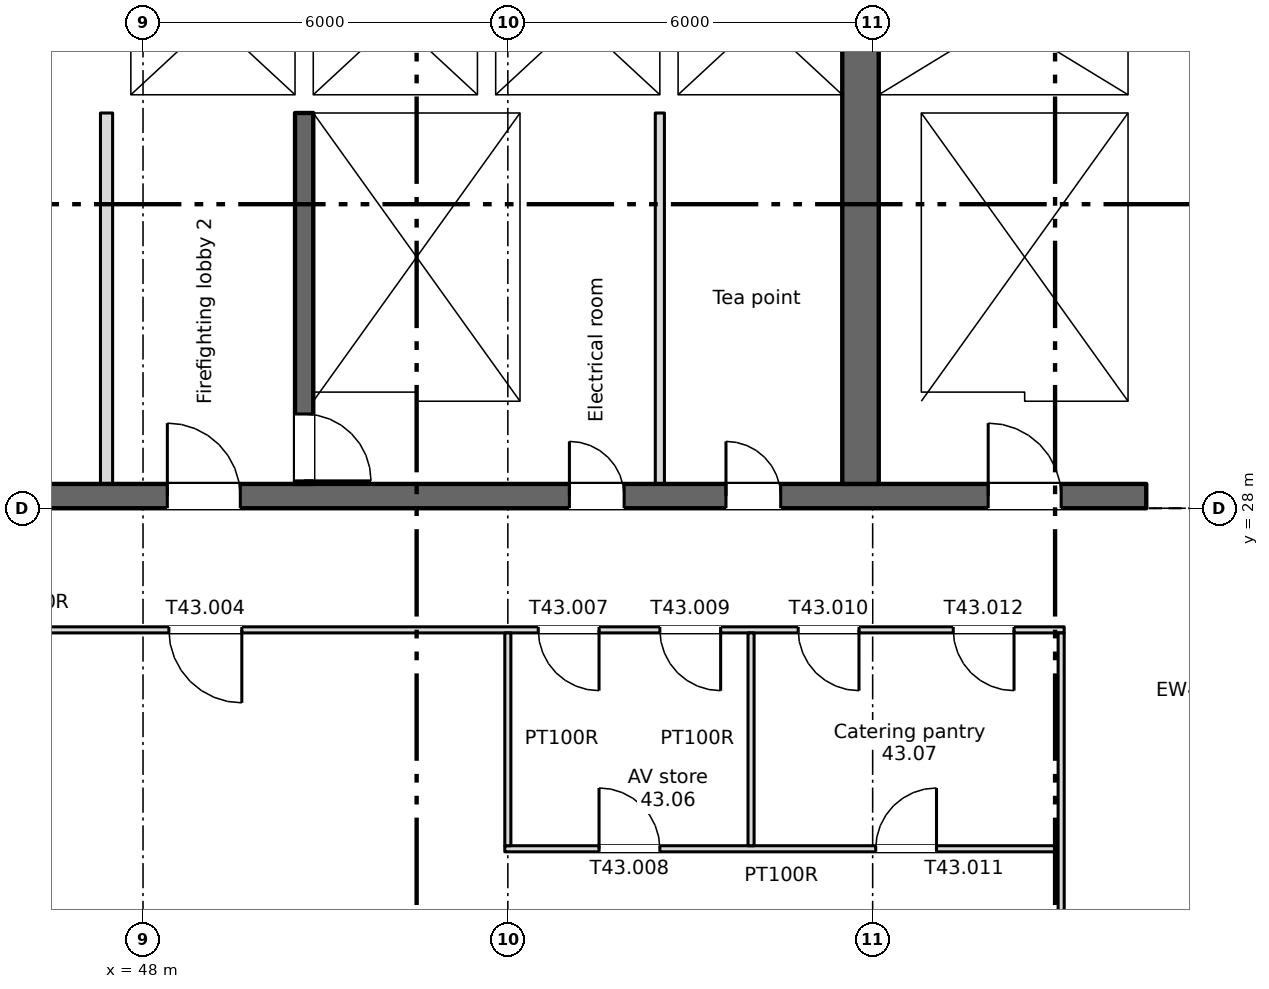
"""IFC4 building model, lengths in metres.
Left out: names, types, materials, properties, quantities, classifications, styles, units other than length and angle.
Written with IfcOpenShell. Run it as: python <this file> out.ifc"""

import sys

from ifc_helpers import new_model, si_unit, direction, frame, frame_2d, origin, place, context, subcontext, project, spatial, rectangle, extrude, element, fill, save


model = new_model("IFC4")
c1 = context("Model", 3, precision=1e-05, world=origin(), true_north=direction((0.0, 1.0)))
c2 = subcontext(c1, "Body", "Model", "MODEL_VIEW")
j1 = project(units=[si_unit("LENGTHUNIT", "METRE"), si_unit("PLANEANGLEUNIT", "RADIAN")], contexts=[c1])
p1 = place(None, origin())
s1 = spatial("IfcSite", under=j1, at=p1, CompositionType="ELEMENT")
p2 = place(p1, origin())
s2 = spatial("IfcBuilding", under=s1, at=p2, CompositionType="ELEMENT")
p3 = place(p2, frame((0.0, 0.0, 231.75)))
s3 = spatial("IfcBuildingStorey", under=s2, at=p3, CompositionType="ELEMENT", Elevation=231.75)
p4 = place(p3, frame((6.5, 28.2, 0.0), z_axis=(0.0, 0.0, 1.0), x_axis=(1.0, 0.0, 0.0)))
e1 = element("IfcWall", 1, at=p4, inside=s3, PredefinedType="SHEAR", context=c2, shape_type="SweptSolid", body=[
    extrude(rectangle(XDim=58.0, YDim=0.4, at=frame_2d((29.0, 0.0))), origin(), (0.0, 0.0, 1.0), 3.4),
])
p5 = place(p4, frame((13.012, 0.0, 0.0)))
e2 = element("IfcOpeningElement", 2, at=p5, cuts=e1, PredefinedType="OPENING", context=c2, shape_type="SweptSolid", body=[
    extrude(rectangle(XDim=0.9, YDim=2.1, at=frame_2d((0.45, 1.05))), frame((0.0, 0.21, 0.0), z_axis=(0.0, -1.0, 0.0), x_axis=(1.0, 0.0, 0.0)), (0.0, 0.0, 1.0), 0.42),
])
p6 = place(p4, frame((15.587, 0.0, 0.0)))
e3 = element("IfcOpeningElement", 3, at=p6, cuts=e1, PredefinedType="OPENING", context=c2, shape_type="SweptSolid", body=[
    extrude(rectangle(XDim=0.9, YDim=2.1, at=frame_2d((0.45, 1.05))), frame((0.0, 0.21, 0.0), z_axis=(0.0, -1.0, 0.0), x_axis=(1.0, 0.0, 0.0)), (0.0, 0.0, 1.0), 0.42),
])
p7 = place(p4, frame((48.512, 0.0, 0.0)))
e4 = element("IfcOpeningElement", 4, at=p7, cuts=e1, PredefinedType="OPENING", context=c2, shape_type="SweptSolid", body=[
    extrude(rectangle(XDim=0.9, YDim=2.1, at=frame_2d((0.45, 1.05))), frame((0.0, 0.21, 0.0), z_axis=(0.0, -1.0, 0.0), x_axis=(1.0, 0.0, 0.0)), (0.0, 0.0, 1.0), 0.42),
])
p8 = place(p4, frame((51.087, 0.0, 0.0)))
e5 = element("IfcOpeningElement", 5, at=p8, cuts=e1, PredefinedType="OPENING", context=c2, shape_type="SweptSolid", body=[
    extrude(rectangle(XDim=0.9, YDim=2.1, at=frame_2d((0.45, 1.05))), frame((0.0, 0.21, 0.0), z_axis=(0.0, -1.0, 0.0), x_axis=(1.0, 0.0, 0.0)), (0.0, 0.0, 1.0), 0.42),
])
p9 = place(p4, frame((0.762, 0.0, 0.0)))
e6 = element("IfcOpeningElement", 6, at=p9, cuts=e1, PredefinedType="OPENING", context=c2, shape_type="SweptSolid", body=[
    extrude(rectangle(XDim=0.9, YDim=2.1, at=frame_2d((0.45, 1.05))), frame((0.0, 0.21, 0.0), z_axis=(0.0, -1.0, 0.0), x_axis=(1.0, 0.0, 0.0)), (0.0, 0.0, 1.0), 0.42),
])
p10 = place(p4, frame((2.337, 0.0, 0.0)))
e7 = element("IfcOpeningElement", 7, at=p10, cuts=e1, PredefinedType="OPENING", context=c2, shape_type="SweptSolid", body=[
    extrude(rectangle(XDim=0.9, YDim=2.1, at=frame_2d((0.45, 1.05))), frame((0.0, 0.21, 0.0), z_axis=(0.0, -1.0, 0.0), x_axis=(1.0, 0.0, 0.0)), (0.0, 0.0, 1.0), 0.42),
])
p11 = place(p4, frame((4.9, 0.0, 0.0)))
e8 = element("IfcOpeningElement", 8, at=p11, cuts=e1, PredefinedType="OPENING", context=c2, shape_type="SweptSolid", body=[
    extrude(rectangle(XDim=1.2, YDim=2.1, at=frame_2d((0.6, 1.05))), frame((0.0, 0.21, 0.0), z_axis=(0.0, -1.0, 0.0), x_axis=(1.0, 0.0, 0.0)), (0.0, 0.0, 1.0), 0.42),
])
p12 = place(p4, frame((31.9, 0.0, 0.0)))
e9 = element("IfcOpeningElement", 9, at=p12, cuts=e1, PredefinedType="OPENING", context=c2, shape_type="SweptSolid", body=[
    extrude(rectangle(XDim=1.2, YDim=2.1, at=frame_2d((0.6, 1.05))), frame((0.0, 0.21, 0.0), z_axis=(0.0, -1.0, 0.0), x_axis=(1.0, 0.0, 0.0)), (0.0, 0.0, 1.0), 0.42),
])
p13 = place(p4, frame((55.4, 0.0, 0.0)))
e10 = element("IfcOpeningElement", 10, at=p13, cuts=e1, PredefinedType="OPENING", context=c2, shape_type="SweptSolid", body=[
    extrude(rectangle(XDim=1.2, YDim=2.1, at=frame_2d((0.6, 1.05))), frame((0.0, 0.21, 0.0), z_axis=(0.0, -1.0, 0.0), x_axis=(1.0, 0.0, 0.0)), (0.0, 0.0, 1.0), 0.42),
])
p14 = place(p4, frame((21.9, 0.0, 0.0)))
e11 = element("IfcOpeningElement", 11, at=p14, cuts=e1, PredefinedType="OPENING", context=c2, shape_type="SweptSolid", body=[
    extrude(rectangle(XDim=1.2, YDim=2.1, at=frame_2d((0.6, 1.05))), frame((0.0, 0.21, 0.0), z_axis=(0.0, -1.0, 0.0), x_axis=(1.0, 0.0, 0.0)), (0.0, 0.0, 1.0), 0.42),
])
p15 = place(p4, frame((41.9, 0.0, 0.0)))
e12 = element("IfcOpeningElement", 12, at=p15, cuts=e1, PredefinedType="OPENING", context=c2, shape_type="SweptSolid", body=[
    extrude(rectangle(XDim=1.2, YDim=2.1, at=frame_2d((0.6, 1.05))), frame((0.0, 0.21, 0.0), z_axis=(0.0, -1.0, 0.0), x_axis=(1.0, 0.0, 0.0)), (0.0, 0.0, 1.0), 0.42),
])
p16 = place(p4, frame((25.05, 0.0, 0.0)))
e13 = element("IfcOpeningElement", 13, at=p16, cuts=e1, PredefinedType="OPENING", context=c2, shape_type="SweptSolid", body=[
    extrude(rectangle(XDim=2.4, YDim=2.1, at=frame_2d((1.2, 1.05))), frame((0.0, 0.21, 0.0), z_axis=(0.0, -1.0, 0.0), x_axis=(1.0, 0.0, 0.0)), (0.0, 0.0, 1.0), 0.42),
])
p17 = place(p4, frame((37.55, 0.0, 0.0)))
e14 = element("IfcOpeningElement", 14, at=p17, cuts=e1, PredefinedType="OPENING", context=c2, shape_type="SweptSolid", body=[
    extrude(rectangle(XDim=2.4, YDim=2.1, at=frame_2d((1.2, 1.05))), frame((0.0, 0.21, 0.0), z_axis=(0.0, -1.0, 0.0), x_axis=(1.0, 0.0, 0.0)), (0.0, 0.0, 1.0), 0.42),
])
p18 = place(p4, frame((8.25, 0.0, 0.0)))
e15 = element("IfcOpeningElement", 15, at=p18, cuts=e1, PredefinedType="OPENING", context=c2, shape_type="SweptSolid", body=[
    extrude(rectangle(XDim=2.4, YDim=2.1, at=frame_2d((1.2, 1.05))), frame((0.0, 0.21, 0.0), z_axis=(0.0, -1.0, 0.0), x_axis=(1.0, 0.0, 0.0)), (0.0, 0.0, 1.0), 0.42),
])
p19 = place(p4, frame((29.05, 0.0, 0.0)))
e16 = element("IfcOpeningElement", 16, at=p19, cuts=e1, PredefinedType="OPENING", context=c2, shape_type="SweptSolid", body=[
    extrude(rectangle(XDim=0.9, YDim=2.1, at=frame_2d((0.45, 1.05))), frame((0.0, 0.21, 0.0), z_axis=(0.0, -1.0, 0.0), x_axis=(1.0, 0.0, 0.0)), (0.0, 0.0, 1.0), 0.42),
])
p20 = place(p4, frame((35.05, 0.0, 0.0)))
e17 = element("IfcOpeningElement", 17, at=p20, cuts=e1, PredefinedType="OPENING", context=c2, shape_type="SweptSolid", body=[
    extrude(rectangle(XDim=0.9, YDim=2.1, at=frame_2d((0.45, 1.05))), frame((0.0, 0.21, 0.0), z_axis=(0.0, -1.0, 0.0), x_axis=(1.0, 0.0, 0.0)), (0.0, 0.0, 1.0), 0.42),
])
p21 = place(p3, frame((64.35, 34.8, 0.0), z_axis=(0.0, 0.0, 1.0), x_axis=(0.0, 1.0, 0.0)))
e18 = element("IfcWall", 18, at=p21, inside=s3, PredefinedType="SHEAR", context=c2, shape_type="SweptSolid", body=[
    extrude(rectangle(XDim=6.45, YDim=0.3, at=frame_2d((3.225, 0.0))), origin(), (0.0, 0.0, 1.0), 3.4),
])
p22 = place(p3, frame((59.8, 28.4, 0.0), z_axis=(0.0, 0.0, 1.0), x_axis=(0.0, 1.0, 0.0)))
e19 = element("IfcWall", 19, at=p22, inside=s3, PredefinedType="SHEAR", context=c2, shape_type="SweptSolid", body=[
    extrude(rectangle(XDim=15.1, YDim=0.6, at=frame_2d((7.55, 0.0))), origin(), (0.0, 0.0, 1.0), 3.4),
])
p23 = place(p22, frame((9.6, 0.0, 0.0)))
e20 = element("IfcOpeningElement", 20, at=p23, cuts=e19, PredefinedType="OPENING", context=c2, shape_type="SweptSolid", body=[
    extrude(rectangle(XDim=2.0, YDim=2.1, at=frame_2d((1.0, 1.05))), frame((0.0, 0.31, 0.0), z_axis=(0.0, -1.0, 0.0), x_axis=(1.0, 0.0, 0.0)), (0.0, 0.0, 1.0), 0.62),
])
p24 = place(p3, frame((50.65, 34.5, 0.0), z_axis=(0.0, 0.0, 1.0), x_axis=(0.0, -1.0, 0.0)))
e21 = element("IfcWall", 21, at=p24, inside=s3, PredefinedType="SHEAR", context=c2, shape_type="SweptSolid", body=[
    extrude(rectangle(XDim=6.1, YDim=0.3, at=frame_2d((3.05, 0.0))), origin(), (0.0, 0.0, 1.0), 3.4),
])
p25 = place(p24, frame((4.95, 0.0, 0.0)))
e22 = element("IfcOpeningElement", 22, at=p25, cuts=e21, PredefinedType="OPENING", context=c2, shape_type="SweptSolid", body=[
    extrude(rectangle(XDim=1.1, YDim=2.1, at=frame_2d((0.55, 1.05))), frame((0.0, 0.16, 0.0), z_axis=(0.0, -1.0, 0.0), x_axis=(1.0, 0.0, 0.0)), (0.0, 0.0, 1.0), 0.32),
])
p26 = place(p3, frame((54.35, 28.4, 0.0), z_axis=(0.0, 0.0, 1.0), x_axis=(0.0, 1.0, 0.0)))
e23 = element("IfcWall", 23, at=p26, inside=s3, PredefinedType="SHEAR", context=c2, shape_type="SweptSolid", body=[
    extrude(rectangle(XDim=6.1, YDim=0.3, at=frame_2d((3.05, 0.0))), origin(), (0.0, 0.0, 1.0), 3.4),
])
p27 = place(p3, frame((60.45, 28.4, 0.0), z_axis=(0.0, 0.0, 1.0), x_axis=(0.0, 1.0, 0.0)))
e24 = element("IfcWall", 24, at=p27, inside=s3, PredefinedType="SHEAR", context=c2, shape_type="SweptSolid", body=[
    extrude(rectangle(XDim=6.1, YDim=0.7, at=frame_2d((3.05, 0.0))), origin(), (0.0, 0.0, 1.0), 3.4),
])
p28 = place(p3, frame((64.35, 28.4, 0.0), z_axis=(0.0, 0.0, 1.0), x_axis=(0.0, 1.0, 0.0)))
e25 = element("IfcWall", 25, at=p28, inside=s3, PredefinedType="SHEAR", context=c2, shape_type="SweptSolid", body=[
    extrude(rectangle(XDim=6.1, YDim=0.3, at=frame_2d((3.05, 0.0))), origin(), (0.0, 0.0, 1.0), 3.4),
])
p29 = place(p3, frame((47.3, 34.65, 0.0), z_axis=(0.0, 0.0, 1.0), x_axis=(1.0, 0.0, 0.0)))
e26 = element("IfcWall", 26, at=p29, inside=s3, PredefinedType="SHEAR", context=c2, shape_type="SweptSolid", body=[
    extrude(rectangle(XDim=12.2, YDim=0.3, at=frame_2d((6.1, 0.0))), origin(), (0.0, 0.0, 1.0), 3.4),
])
p30 = place(p29, frame((1.3, 0.0, 0.0)))
e27 = element("IfcOpeningElement", 27, at=p30, cuts=e26, PredefinedType="OPENING", context=c2, shape_type="SweptSolid", body=[
    extrude(rectangle(XDim=1.1, YDim=2.1, at=frame_2d((0.55, 1.05))), frame((0.0, 0.16, 0.0), z_axis=(0.0, -1.0, 0.0), x_axis=(1.0, 0.0, 0.0)), (0.0, 0.0, 1.0), 0.32),
])
p31 = place(p3, frame((60.1, 34.65, 0.0), z_axis=(0.0, 0.0, 1.0), x_axis=(1.0, 0.0, 0.0)))
e28 = element("IfcWall", 28, at=p31, inside=s3, PredefinedType="SHEAR", context=c2, shape_type="SweptSolid", body=[
    extrude(rectangle(XDim=4.4, YDim=0.3, at=frame_2d((2.2, 0.0))), origin(), (0.0, 0.0, 1.0), 3.4),
])
p32 = place(p3, frame((47.55, 34.8, 0.0), z_axis=(0.0, 0.0, 1.0), x_axis=(0.0, 1.0, 0.0)))
e29 = element("IfcWall", 29, at=p32, inside=s3, PredefinedType="SHEAR", context=c2, shape_type="SweptSolid", body=[
    extrude(rectangle(XDim=2.5, YDim=0.5, at=frame_2d((1.25, 0.0))), origin(), (0.0, 0.0, 1.0), 3.4),
])
for number, where, z_axis, x_axis in (
    (30, (50.65, 34.8, 0.0), (0.0, 0.0, 1.0), (0.0, 1.0, 0.0)),
    (31, (53.65, 34.8, 0.0), (0.0, 0.0, 1.0), (0.0, 1.0, 0.0)),
    (32, (56.65, 34.8, 0.0), (0.0, 0.0, 1.0), (0.0, 1.0, 0.0)),
):
    element("IfcWall", number, at=place(p3, frame(where, z_axis=z_axis, x_axis=x_axis)), inside=s3, PredefinedType="SHEAR", context=c2, shape_type="SweptSolid", body=[
        extrude(rectangle(XDim=2.5, YDim=0.3, at=frame_2d((1.25, 0.0))), origin(), (0.0, 0.0, 1.0), 3.4),
    ])
p33 = place(p3, frame((47.4, 28.4, 0.0), z_axis=(0.0, 0.0, 1.0), x_axis=(0.0, 1.0, 0.0)))
e33 = element("IfcWall", 33, at=p33, inside=s3, PredefinedType="PARTITIONING", context=c2, shape_type="SweptSolid", body=[
    extrude(rectangle(XDim=6.1, YDim=0.2, at=frame_2d((3.05, 0.0))), origin(), (0.0, 0.0, 1.0), 3.4),
])
p34 = place(p3, frame((56.5, 28.4, 0.0), z_axis=(0.0, 0.0, 1.0), x_axis=(0.0, 1.0, 0.0)))
e34 = element("IfcWall", 34, at=p34, inside=s3, PredefinedType="PARTITIONING", context=c2, shape_type="SweptSolid", body=[
    extrude(rectangle(XDim=6.1, YDim=0.15, at=frame_2d((3.05, 0.0))), origin(), (0.0, 0.0, 1.0), 3.4),
])
p35 = place(p3, frame((53.95, 22.4, 0.0), z_axis=(0.0, 0.0, 1.0), x_axis=(1.0, 0.0, 0.0)))
e35 = element("IfcWall", 35, at=p35, inside=s3, PredefinedType="PARTITIONING", context=c2, shape_type="SweptSolid", body=[
    extrude(rectangle(XDim=9.1, YDim=0.1, at=frame_2d((4.55, 0.0))), origin(), (0.0, 0.0, 1.0), 3.4),
])
p36 = place(p35, frame((1.55, 0.0, 0.0)))
e36 = element("IfcOpeningElement", 36, at=p36, cuts=e35, PredefinedType="OPENING", context=c2, shape_type="SweptSolid", body=[
    extrude(rectangle(XDim=1.0, YDim=2.1, at=frame_2d((0.5, 1.05))), frame((0.0, 0.06, 0.0), z_axis=(0.0, -1.0, 0.0), x_axis=(1.0, 0.0, 0.0)), (0.0, 0.0, 1.0), 0.12),
])
p37 = place(p35, frame((6.1, 0.0, 0.0)))
e37 = element("IfcOpeningElement", 37, at=p37, cuts=e35, PredefinedType="OPENING", context=c2, shape_type="SweptSolid", body=[
    extrude(rectangle(XDim=1.0, YDim=2.1, at=frame_2d((0.5, 1.05))), frame((0.0, 0.06, 0.0), z_axis=(0.0, -1.0, 0.0), x_axis=(1.0, 0.0, 0.0)), (0.0, 0.0, 1.0), 0.12),
])
p38 = place(p3, frame((34.05, 26.0, 0.0), z_axis=(0.0, 0.0, 1.0), x_axis=(1.0, 0.0, 0.0)))
e38 = element("IfcWall", 38, at=p38, inside=s3, PredefinedType="PARTITIONING", context=c2, shape_type="SweptSolid", body=[
    extrude(rectangle(XDim=29.1, YDim=0.1, at=frame_2d((14.55, 0.0))), origin(), (0.0, 0.0, 1.0), 3.4),
])
p39 = place(p38, frame((4.425, 0.0, 0.0)))
e39 = element("IfcOpeningElement", 39, at=p39, cuts=e38, PredefinedType="OPENING", context=c2, shape_type="SweptSolid", body=[
    extrude(rectangle(XDim=1.2, YDim=2.1, at=frame_2d((0.6, 1.05))), frame((0.0, 0.06, 0.0), z_axis=(0.0, -1.0, 0.0), x_axis=(1.0, 0.0, 0.0)), (0.0, 0.0, 1.0), 0.12),
])
p40 = place(p38, frame((14.375, 0.0, 0.0)))
e40 = element("IfcOpeningElement", 40, at=p40, cuts=e38, PredefinedType="OPENING", context=c2, shape_type="SweptSolid", body=[
    extrude(rectangle(XDim=1.2, YDim=2.1, at=frame_2d((0.6, 1.05))), frame((0.0, 0.06, 0.0), z_axis=(0.0, -1.0, 0.0), x_axis=(1.0, 0.0, 0.0)), (0.0, 0.0, 1.0), 0.12),
])
p41 = place(p38, frame((20.45, 0.0, 0.0)))
e41 = element("IfcOpeningElement", 41, at=p41, cuts=e38, PredefinedType="OPENING", context=c2, shape_type="SweptSolid", body=[
    extrude(rectangle(XDim=1.0, YDim=2.1, at=frame_2d((0.5, 1.05))), frame((0.0, 0.06, 0.0), z_axis=(0.0, -1.0, 0.0), x_axis=(1.0, 0.0, 0.0)), (0.0, 0.0, 1.0), 0.12),
])
p42 = place(p38, frame((22.45, 0.0, 0.0)))
e42 = element("IfcOpeningElement", 42, at=p42, cuts=e38, PredefinedType="OPENING", context=c2, shape_type="SweptSolid", body=[
    extrude(rectangle(XDim=1.0, YDim=2.1, at=frame_2d((0.5, 1.05))), frame((0.0, 0.06, 0.0), z_axis=(0.0, -1.0, 0.0), x_axis=(1.0, 0.0, 0.0)), (0.0, 0.0, 1.0), 0.12),
])
p43 = place(p38, frame((24.725, 0.0, 0.0)))
e43 = element("IfcOpeningElement", 43, at=p43, cuts=e38, PredefinedType="OPENING", context=c2, shape_type="SweptSolid", body=[
    extrude(rectangle(XDim=1.0, YDim=2.1, at=frame_2d((0.5, 1.05))), frame((0.0, 0.06, 0.0), z_axis=(0.0, -1.0, 0.0), x_axis=(1.0, 0.0, 0.0)), (0.0, 0.0, 1.0), 0.12),
])
p44 = place(p38, frame((27.275, 0.0, 0.0)))
e44 = element("IfcOpeningElement", 44, at=p44, cuts=e38, PredefinedType="OPENING", context=c2, shape_type="SweptSolid", body=[
    extrude(rectangle(XDim=1.0, YDim=2.1, at=frame_2d((0.5, 1.05))), frame((0.0, 0.06, 0.0), z_axis=(0.0, -1.0, 0.0), x_axis=(1.0, 0.0, 0.0)), (0.0, 0.0, 1.0), 0.12),
])
for number, where, z_axis, x_axis in (
    (45, (54.0, 22.45, 0.0), (0.0, 0.0, 1.0), (0.0, 1.0, 0.0)),
    (46, (58.0, 22.45, 0.0), (0.0, 0.0, 1.0), (0.0, 1.0, 0.0)),
):
    element("IfcWall", number, at=place(p3, frame(where, z_axis=z_axis, x_axis=x_axis)), inside=s3, PredefinedType="PARTITIONING", context=c2, shape_type="SweptSolid", body=[
        extrude(rectangle(XDim=3.5, YDim=0.1, at=frame_2d((1.75, 0.0))), origin(), (0.0, 0.0, 1.0), 3.4),
    ])
p45 = place(p3, frame((63.1, 10.55, 0.0), z_axis=(0.0, 0.0, 1.0), x_axis=(0.0, 1.0, 0.0)))
e47 = element("IfcWall", 47, at=p45, inside=s3, PredefinedType="PARTITIONING", context=c2, shape_type="SweptSolid", body=[
    extrude(rectangle(XDim=15.4, YDim=0.1, at=frame_2d((7.7, 0.0))), origin(), (0.0, 0.0, 1.0), 3.4),
])
p46 = place(p7, origin())
e48 = element("IfcDoor", 48, at=p46, inside=s3, OperationType="SINGLE_SWING_LEFT", PredefinedType="DOOR", context=c2, shape_type="SweptSolid", body=[
    extrude(rectangle(XDim=0.9, YDim=2.1, at=frame_2d((0.45, 1.05))), frame((0.0, 0.025, 0.0), z_axis=(0.0, -1.0, 0.0), x_axis=(1.0, 0.0, 0.0)), (0.0, 0.0, 1.0), 0.05),
])
fill(e4, e48)
p47 = place(p8, origin())
e49 = element("IfcDoor", 49, at=p47, inside=s3, OperationType="SINGLE_SWING_LEFT", PredefinedType="DOOR", context=c2, shape_type="SweptSolid", body=[
    extrude(rectangle(XDim=0.9, YDim=2.1, at=frame_2d((0.45, 1.05))), frame((0.0, 0.025, 0.0), z_axis=(0.0, -1.0, 0.0), x_axis=(1.0, 0.0, 0.0)), (0.0, 0.0, 1.0), 0.05),
])
fill(e5, e49)
p48 = place(p30, origin())
e50 = element("IfcDoor", 50, at=p48, inside=s3, OperationType="SLIDING_TO_LEFT", PredefinedType="DOOR", context=c2, shape_type="SweptSolid", body=[
    extrude(rectangle(XDim=1.1, YDim=2.1, at=frame_2d((0.55, 1.05))), frame((0.0, 0.025, 0.0), z_axis=(0.0, -1.0, 0.0), x_axis=(1.0, 0.0, 0.0)), (0.0, 0.0, 1.0), 0.05),
])
fill(e27, e50)
p49 = place(p25, origin())
e51 = element("IfcDoor", 51, at=p49, inside=s3, OperationType="SINGLE_SWING_RIGHT", PredefinedType="DOOR", context=c2, shape_type="SweptSolid", body=[
    extrude(rectangle(XDim=1.1, YDim=2.1, at=frame_2d((0.55, 1.05))), frame((0.0, 0.025, 0.0), z_axis=(0.0, -1.0, 0.0), x_axis=(1.0, 0.0, 0.0)), (0.0, 0.0, 1.0), 0.05),
])
fill(e22, e51)
p50 = place(p13, origin())
e52 = element("IfcDoor", 52, at=p50, inside=s3, OperationType="SINGLE_SWING_LEFT", PredefinedType="DOOR", context=c2, shape_type="SweptSolid", body=[
    extrude(rectangle(XDim=1.2, YDim=2.1, at=frame_2d((0.6, 1.05))), frame((0.0, 0.025, 0.0), z_axis=(0.0, -1.0, 0.0), x_axis=(1.0, 0.0, 0.0)), (0.0, 0.0, 1.0), 0.05),
])
fill(e10, e52)
p51 = place(p15, origin())
e53 = element("IfcDoor", 53, at=p51, inside=s3, OperationType="SINGLE_SWING_LEFT", PredefinedType="DOOR", context=c2, shape_type="SweptSolid", body=[
    extrude(rectangle(XDim=1.2, YDim=2.1, at=frame_2d((0.6, 1.05))), frame((0.0, 0.025, 0.0), z_axis=(0.0, -1.0, 0.0), x_axis=(1.0, 0.0, 0.0)), (0.0, 0.0, 1.0), 0.05),
])
fill(e12, e53)
p52 = place(p40, origin())
e54 = element("IfcDoor", 54, at=p52, inside=s3, OperationType="SINGLE_SWING_RIGHT", PredefinedType="DOOR", context=c2, shape_type="SweptSolid", body=[
    extrude(rectangle(XDim=1.2, YDim=2.1, at=frame_2d((0.6, 1.05))), frame((0.0, 0.025, 0.0), z_axis=(0.0, -1.0, 0.0), x_axis=(1.0, 0.0, 0.0)), (0.0, 0.0, 1.0), 0.05),
])
fill(e40, e54)
p53 = place(p41, origin())
e55 = element("IfcDoor", 55, at=p53, inside=s3, OperationType="SINGLE_SWING_RIGHT", PredefinedType="DOOR", context=c2, shape_type="SweptSolid", body=[
    extrude(rectangle(XDim=1.0, YDim=2.1, at=frame_2d((0.5, 1.05))), frame((0.0, 0.025, 0.0), z_axis=(0.0, -1.0, 0.0), x_axis=(1.0, 0.0, 0.0)), (0.0, 0.0, 1.0), 0.05),
])
fill(e41, e55)
p54 = place(p36, origin())
e56 = element("IfcDoor", 56, at=p54, inside=s3, OperationType="SINGLE_SWING_LEFT", PredefinedType="DOOR", context=c2, shape_type="SweptSolid", body=[
    extrude(rectangle(XDim=1.0, YDim=2.1, at=frame_2d((0.5, 1.05))), frame((0.0, 0.025, 0.0), z_axis=(0.0, -1.0, 0.0), x_axis=(1.0, 0.0, 0.0)), (0.0, 0.0, 1.0), 0.05),
])
fill(e36, e56)
p55 = place(p42, origin())
e57 = element("IfcDoor", 57, at=p55, inside=s3, OperationType="SINGLE_SWING_RIGHT", PredefinedType="DOOR", context=c2, shape_type="SweptSolid", body=[
    extrude(rectangle(XDim=1.0, YDim=2.1, at=frame_2d((0.5, 1.05))), frame((0.0, 0.025, 0.0), z_axis=(0.0, -1.0, 0.0), x_axis=(1.0, 0.0, 0.0)), (0.0, 0.0, 1.0), 0.05),
])
fill(e42, e57)
p56 = place(p43, origin())
e58 = element("IfcDoor", 58, at=p56, inside=s3, OperationType="SINGLE_SWING_RIGHT", PredefinedType="DOOR", context=c2, shape_type="SweptSolid", body=[
    extrude(rectangle(XDim=1.0, YDim=2.1, at=frame_2d((0.5, 1.05))), frame((0.0, 0.025, 0.0), z_axis=(0.0, -1.0, 0.0), x_axis=(1.0, 0.0, 0.0)), (0.0, 0.0, 1.0), 0.05),
])
fill(e43, e58)
p57 = place(p37, origin())
e59 = element("IfcDoor", 59, at=p57, inside=s3, OperationType="SINGLE_SWING_RIGHT", PredefinedType="DOOR", context=c2, shape_type="SweptSolid", body=[
    extrude(rectangle(XDim=1.0, YDim=2.1, at=frame_2d((0.5, 1.05))), frame((0.0, 0.025, 0.0), z_axis=(0.0, -1.0, 0.0), x_axis=(1.0, 0.0, 0.0)), (0.0, 0.0, 1.0), 0.05),
])
fill(e37, e59)
p58 = place(p44, origin())
e60 = element("IfcDoor", 60, at=p58, inside=s3, OperationType="SINGLE_SWING_RIGHT", PredefinedType="DOOR", context=c2, shape_type="SweptSolid", body=[
    extrude(rectangle(XDim=1.0, YDim=2.1, at=frame_2d((0.5, 1.05))), frame((0.0, 0.025, 0.0), z_axis=(0.0, -1.0, 0.0), x_axis=(1.0, 0.0, 0.0)), (0.0, 0.0, 1.0), 0.05),
])
fill(e44, e60)
save(model, sys.argv[1])
